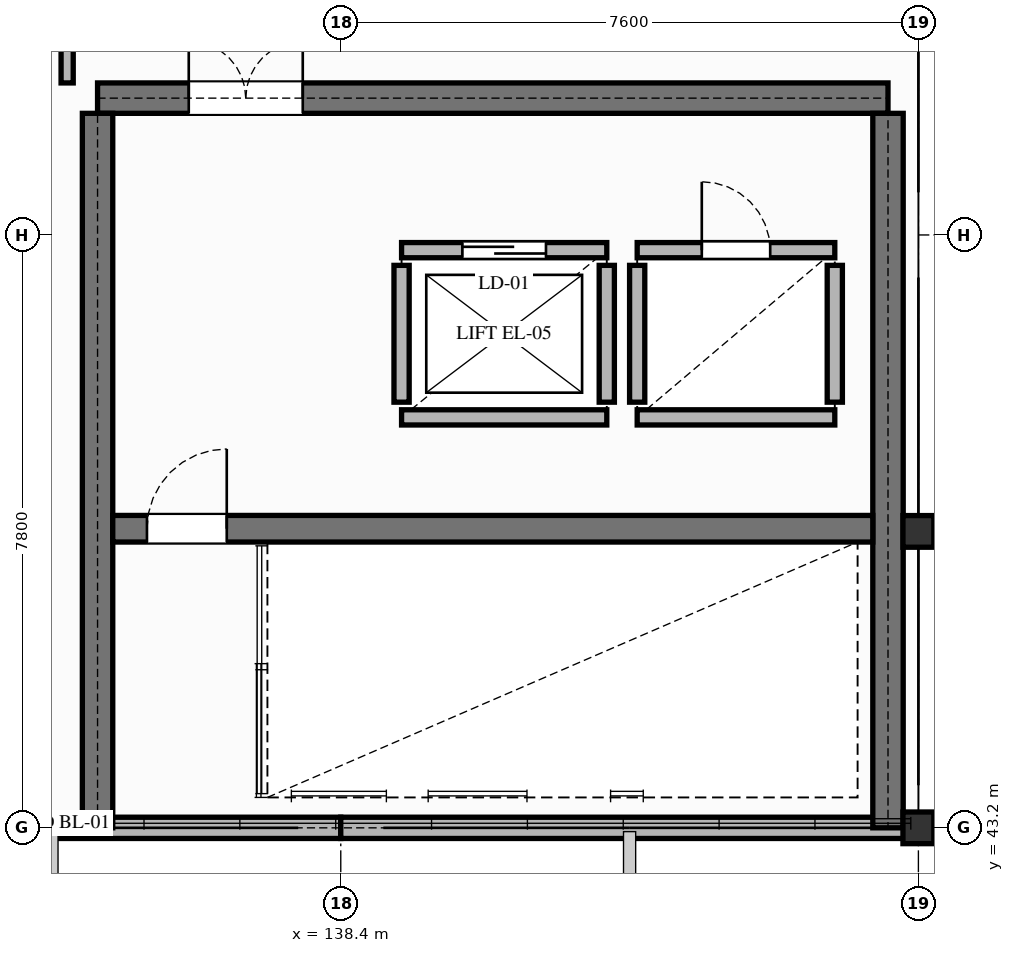
"""IFC4 building model, lengths in metres.
Left out: names, types, materials, properties, quantities, classifications, styles, units other than length and angle.
Written with IfcOpenShell. Run it as: python <this file> out.ifc"""

import sys

from ifc_helpers import new_model, si_unit, direction, frame, frame_2d, origin, origin_2d, place, context, subcontext, project, spatial, polyline, rectangle, i_section, outline, extrude, element, fill, save


model = new_model("IFC4")
c1 = context("Model", 3, precision=1e-05, world=origin(), true_north=direction((0.0, 1.0)))
c2 = subcontext(c1, "Body", "Model", "MODEL_VIEW")
j1 = project(units=[si_unit("LENGTHUNIT", "METRE"), si_unit("PLANEANGLEUNIT", "RADIAN")], contexts=[c1])
p1 = place(None, origin())
s1 = spatial("IfcSite", under=j1, at=p1, CompositionType="ELEMENT")
p2 = place(p1, origin())
s2 = spatial("IfcBuilding", under=s1, at=p2, CompositionType="ELEMENT")
p3 = place(p2, frame((0.0, 0.0, 12.78)))
s3 = spatial("IfcBuildingStorey", under=s2, at=p3, CompositionType="ELEMENT", Elevation=12.78)
p4 = place(p3, frame((146.0, 47.1, 0.0), z_axis=(0.0, 0.0, 1.0), x_axis=(1.0, 0.0, 0.0)))
e1 = element("IfcColumn", 1, at=p4, inside=s3, PredefinedType="COLUMN", context=c2, shape_type="SweptSolid", body=[
    extrude(i_section(OverallWidth=0.406, OverallDepth=0.417, WebThickness=0.03, FlangeThickness=0.048, at=origin_2d()), origin(), (0.0, 0.0, 1.0), 8.015),
])
p5 = place(p3, frame((146.0, 43.2, 0.0), z_axis=(0.0, 0.0, 1.0), x_axis=(1.0, 0.0, 0.0)))
e2 = element("IfcColumn", 2, at=p5, inside=s3, PredefinedType="COLUMN", context=c2, shape_type="SweptSolid", body=[
    extrude(i_section(OverallWidth=0.406, OverallDepth=0.417, WebThickness=0.03, FlangeThickness=0.048, at=origin_2d()), origin(), (0.0, 0.0, 1.0), 9.025),
])
p6 = place(p3, frame((130.8, 43.2, 4.714), z_axis=(0.0, 0.0, 1.0), x_axis=(1.0, 0.0, 0.0)))
e3 = element("IfcWall", 3, at=p6, inside=s3, PredefinedType="SOLIDWALL", context=c2, shape_type="SweptSolid", body=[
    extrude(outline(polyline([(0.0, 0.0), (7.6, 0.0), (7.6, 3.134), (0.0, 1.617), (0.0, 0.0)])), frame((0.0, 0.14, 0.0), z_axis=(0.0, -1.0, 0.0), x_axis=(1.0, 0.0, 0.0)), (0.0, 0.0, 1.0), 0.28),
])
p7 = place(p3, frame((138.4, 43.2, 4.714), z_axis=(0.0, 0.0, 1.0), x_axis=(1.0, 0.0, 0.0)))
e4 = element("IfcWall", 4, at=p7, inside=s3, PredefinedType="SOLIDWALL", context=c2, shape_type="SweptSolid", body=[
    extrude(outline(polyline([(0.0, 0.0), (7.6, 0.0), (7.6, 4.651), (0.0, 3.134), (0.0, 0.0)])), frame((0.0, 0.14, 0.0), z_axis=(0.0, -1.0, 0.0), x_axis=(1.0, 0.0, 0.0)), (0.0, 0.0, 1.0), 0.28),
])
p8 = place(p3, frame((135.2, 52.8, 0.0), z_axis=(0.0, 0.0, 1.0), x_axis=(1.0, 0.0, 0.0)))
e5 = element("IfcWall", 5, at=p8, inside=s3, PredefinedType="SHEAR", context=c2, shape_type="SweptSolid", body=[
    extrude(rectangle(XDim=10.4, YDim=0.4, at=frame_2d((5.2, 0.0))), origin(), (0.0, 0.0, 1.0), 3.42),
])
p9 = place(p8, frame((1.2, 0.0, 0.0)))
e6 = element("IfcOpeningElement", 6, at=p9, cuts=e5, PredefinedType="OPENING", context=c2, shape_type="SweptSolid", body=[
    extrude(rectangle(XDim=1.5, YDim=2.2, at=frame_2d((0.75, 1.1))), frame((0.0, 0.21, 0.0), z_axis=(0.0, -1.0, 0.0), x_axis=(1.0, 0.0, 0.0)), (0.0, 0.0, 1.0), 0.42),
])
for number, where, z_axis, x_axis in (
    (7, (135.2, 43.2, 0.0), (0.0, 0.0, 1.0), (0.0, 1.0, 0.0)),
    (8, (145.6, 43.2, 0.0), (0.0, 0.0, 1.0), (0.0, 1.0, 0.0)),
):
    element("IfcWall", number, at=place(p3, frame(where, z_axis=z_axis, x_axis=x_axis)), inside=s3, PredefinedType="SHEAR", context=c2, shape_type="SweptSolid", body=[
        extrude(rectangle(XDim=9.4, YDim=0.4, at=frame_2d((4.7, 0.0))), origin(), (0.0, 0.0, 1.0), 3.42),
    ])
p10 = place(p3, frame((135.4, 47.135, 0.0), z_axis=(0.0, 0.0, 1.0), x_axis=(1.0, 0.0, 0.0)))
e9 = element("IfcWall", 9, at=p10, inside=s3, PredefinedType="SHEAR", context=c2, shape_type="SweptSolid", body=[
    extrude(rectangle(XDim=10.0, YDim=0.35, at=frame_2d((5.0, 0.0))), origin(), (0.0, 0.0, 1.0), 3.42),
])
p11 = place(p10, frame((0.45, 0.0, 0.0)))
e10 = element("IfcOpeningElement", 10, at=p11, cuts=e9, PredefinedType="OPENING", context=c2, shape_type="SweptSolid", body=[
    extrude(rectangle(XDim=1.05, YDim=2.2, at=frame_2d((0.525, 1.1))), frame((0.0, 0.185, 0.0), z_axis=(0.0, -1.0, 0.0), x_axis=(1.0, 0.0, 0.0)), (0.0, 0.0, 1.0), 0.37),
])
p12 = place(p3, frame((139.2, 48.6, 0.0), z_axis=(0.0, 0.0, 1.0), x_axis=(1.0, 0.0, 0.0)))
e11 = element("IfcWall", 11, at=p12, inside=s3, PredefinedType="PARTITIONING", context=c2, shape_type="SweptSolid", body=[
    extrude(rectangle(XDim=2.7, YDim=0.2, at=frame_2d((1.35, 0.0))), origin(), (0.0, 0.0, 1.0), 3.42),
])
p13 = place(p3, frame((139.2, 50.8, 0.0), z_axis=(0.0, 0.0, 1.0), x_axis=(1.0, 0.0, 0.0)))
e12 = element("IfcWall", 12, at=p13, inside=s3, PredefinedType="PARTITIONING", context=c2, shape_type="SweptSolid", body=[
    extrude(rectangle(XDim=2.7, YDim=0.2, at=frame_2d((1.35, 0.0))), origin(), (0.0, 0.0, 1.0), 3.42),
])
p14 = place(p13, frame((0.8, 0.0, 0.0)))
e13 = element("IfcOpeningElement", 13, at=p14, cuts=e12, PredefinedType="OPENING", context=c2, shape_type="SweptSolid", body=[
    extrude(rectangle(XDim=1.1, YDim=2.15, at=frame_2d((0.55, 1.075))), frame((0.0, 0.11, 0.0), z_axis=(0.0, -1.0, 0.0), x_axis=(1.0, 0.0, 0.0)), (0.0, 0.0, 1.0), 0.22),
])
for number, where, z_axis, x_axis in (
    (14, (139.2, 48.8, 0.0), (0.0, 0.0, 1.0), (0.0, 1.0, 0.0)),
    (15, (141.9, 48.8, 0.0), (0.0, 0.0, 1.0), (0.0, 1.0, 0.0)),
):
    element("IfcWall", number, at=place(p3, frame(where, z_axis=z_axis, x_axis=x_axis)), inside=s3, PredefinedType="PARTITIONING", context=c2, shape_type="SweptSolid", body=[
        extrude(rectangle(XDim=1.8, YDim=0.2, at=frame_2d((0.9, 0.0))), origin(), (0.0, 0.0, 1.0), 3.42),
    ])
p15 = place(p3, frame((142.3, 48.6, 0.0), z_axis=(0.0, 0.0, 1.0), x_axis=(1.0, 0.0, 0.0)))
e16 = element("IfcWall", 16, at=p15, inside=s3, PredefinedType="PARTITIONING", context=c2, shape_type="SweptSolid", body=[
    extrude(rectangle(XDim=2.6, YDim=0.2, at=frame_2d((1.3, 0.0))), origin(), (0.0, 0.0, 1.0), 3.42),
])
p16 = place(p3, frame((142.3, 50.8, 0.0), z_axis=(0.0, 0.0, 1.0), x_axis=(1.0, 0.0, 0.0)))
e17 = element("IfcWall", 17, at=p16, inside=s3, PredefinedType="PARTITIONING", context=c2, shape_type="SweptSolid", body=[
    extrude(rectangle(XDim=2.6, YDim=0.2, at=frame_2d((1.3, 0.0))), origin(), (0.0, 0.0, 1.0), 3.42),
])
p17 = place(p16, frame((0.85, 0.0, 0.0)))
e18 = element("IfcOpeningElement", 18, at=p17, cuts=e17, PredefinedType="OPENING", context=c2, shape_type="SweptSolid", body=[
    extrude(rectangle(XDim=0.9, YDim=2.1, at=frame_2d((0.45, 1.05))), frame((0.0, 0.11, 0.0), z_axis=(0.0, -1.0, 0.0), x_axis=(1.0, 0.0, 0.0)), (0.0, 0.0, 1.0), 0.22),
])
for number, where, z_axis, x_axis in (
    (19, (142.3, 48.8, 0.0), (0.0, 0.0, 1.0), (0.0, 1.0, 0.0)),
    (20, (144.9, 48.8, 0.0), (0.0, 0.0, 1.0), (0.0, 1.0, 0.0)),
):
    element("IfcWall", number, at=place(p3, frame(where, z_axis=z_axis, x_axis=x_axis)), inside=s3, PredefinedType="PARTITIONING", context=c2, shape_type="SweptSolid", body=[
        extrude(rectangle(XDim=1.8, YDim=0.2, at=frame_2d((0.9, 0.0))), origin(), (0.0, 0.0, 1.0), 3.42),
    ])
p18 = place(p3, frame((134.8, 53.0, 0.0), z_axis=(0.0, 0.0, 1.0), x_axis=(0.0, 1.0, 0.0)))
e21 = element("IfcWall", 21, at=p18, inside=s3, PredefinedType="PARTITIONING", context=c2, shape_type="SweptSolid", body=[
    extrude(rectangle(XDim=21.4, YDim=0.16, at=frame_2d((10.7, 0.0))), origin(), (0.0, 0.0, 1.0), 3.42),
])
p19 = place(p18, frame((9.2, 0.0, 0.0)))
e22 = element("IfcOpeningElement", 22, at=p19, cuts=e21, PredefinedType="OPENING", context=c2, shape_type="SweptSolid", body=[
    extrude(rectangle(XDim=1.6, YDim=2.2, at=frame_2d((0.8, 1.1))), frame((0.0, 0.09, 0.0), z_axis=(0.0, -1.0, 0.0), x_axis=(1.0, 0.0, 0.0)), (0.0, 0.0, 1.0), 0.18),
])
p20 = place(p9, origin())
e23 = element("IfcDoor", 23, at=p20, inside=s3, OperationType="DOUBLE_DOOR_SINGLE_SWING", PredefinedType="DOOR", context=c2, shape_type="SweptSolid", body=[
    extrude(rectangle(XDim=1.5, YDim=2.2, at=frame_2d((0.75, 1.1))), frame((0.0, 0.025, 0.0), z_axis=(0.0, -1.0, 0.0), x_axis=(1.0, 0.0, 0.0)), (0.0, 0.0, 1.0), 0.05),
])
fill(e6, e23)
p21 = place(p11, origin())
e24 = element("IfcDoor", 24, at=p21, inside=s3, OperationType="SINGLE_SWING_RIGHT", PredefinedType="DOOR", context=c2, shape_type="SweptSolid", body=[
    extrude(rectangle(XDim=1.05, YDim=2.2, at=frame_2d((0.525, 1.1))), frame((0.0, 0.025, 0.0), z_axis=(0.0, -1.0, 0.0), x_axis=(1.0, 0.0, 0.0)), (0.0, 0.0, 1.0), 0.05),
])
fill(e10, e24)
p22 = place(p14, origin())
e25 = element("IfcDoor", 25, at=p22, inside=s3, OperationType="SLIDING_TO_LEFT", PredefinedType="DOOR", context=c2, shape_type="SweptSolid", body=[
    extrude(rectangle(XDim=1.1, YDim=2.15, at=frame_2d((0.55, 1.075))), frame((0.0, 0.025, 0.0), z_axis=(0.0, -1.0, 0.0), x_axis=(1.0, 0.0, 0.0)), (0.0, 0.0, 1.0), 0.05),
])
fill(e13, e25)
p23 = place(p17, origin())
e26 = element("IfcDoor", 26, at=p23, inside=s3, OperationType="SINGLE_SWING_LEFT", PredefinedType="DOOR", context=c2, shape_type="SweptSolid", body=[
    extrude(rectangle(XDim=0.9, YDim=2.1, at=frame_2d((0.45, 1.05))), frame((0.0, 0.025, 0.0), z_axis=(0.0, -1.0, 0.0), x_axis=(1.0, 0.0, 0.0)), (0.0, 0.0, 1.0), 0.05),
])
fill(e18, e26)
save(model, sys.argv[1])
